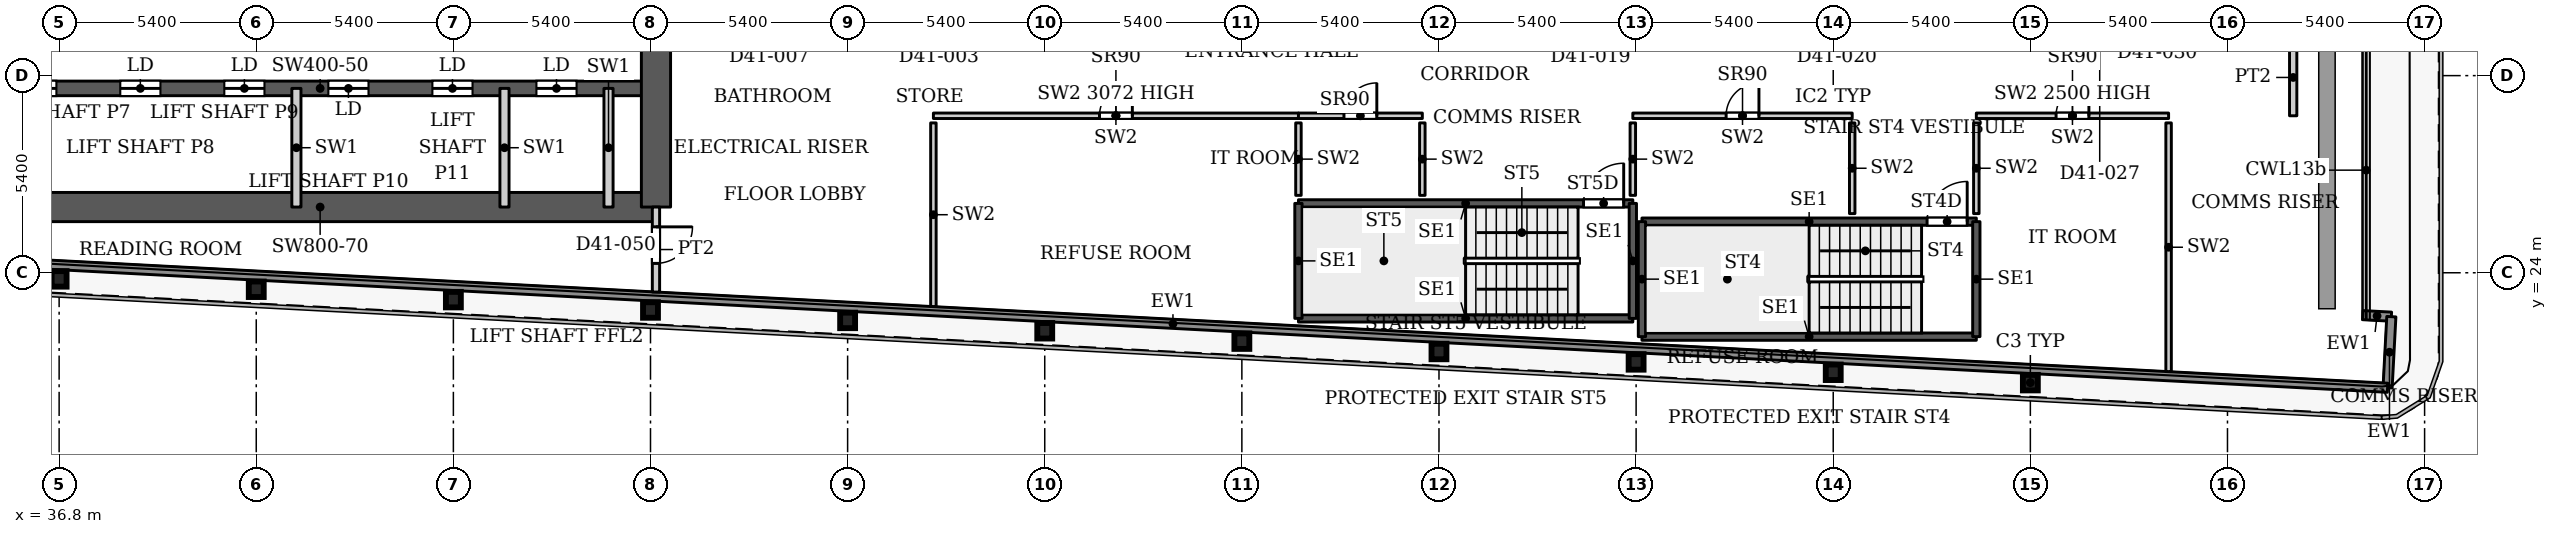
"""IFC4 building model, lengths in metres.
Left out: names, types, materials, properties, quantities, classifications, styles, units other than length and angle.
Written with IfcOpenShell. Run it as: python <this file> out.ifc"""

import sys

from ifc_helpers import new_model, si_unit, direction, frame, frame_2d, origin, origin_2d, place, context, subcontext, project, spatial, rectangle, i_section, extrude, source, transform, mapped, element, fill, save


model = new_model("IFC4")
c1 = context("Model", 3, precision=1e-05, world=origin(), true_north=direction((0.0, 1.0)))
c2 = subcontext(c1, "Body", "Model", "MODEL_VIEW")
j1 = project(units=[si_unit("LENGTHUNIT", "METRE"), si_unit("PLANEANGLEUNIT", "RADIAN")], contexts=[c1])
p1 = place(None, origin())
s1 = spatial("IfcSite", under=j1, at=p1, CompositionType="ELEMENT")
p2 = place(p1, origin())
s2 = spatial("IfcBuilding", under=s1, at=p2, CompositionType="ELEMENT")
p3 = place(p2, frame((0.0, 0.0, 176.0)))
s3 = spatial("IfcBuildingStorey", under=s2, at=p3, CompositionType="ELEMENT", Elevation=176.0)
for number, where, z_axis, x_axis in (
    (1, (90.8, 20.99, 0.0), (0.0, 0.0, 1.0), (1.0, 0.0, 0.0)),
    (2, (85.4, 21.274, 0.0), (0.0, 0.0, 1.0), (1.0, 0.0, 0.0)),
    (3, (80.0, 21.558, 0.0), (0.0, 0.0, 1.0), (1.0, 0.0, 0.0)),
    (4, (74.6, 21.843, 0.0), (0.0, 0.0, 1.0), (1.0, 0.0, 0.0)),
    (5, (69.2, 22.127, 0.0), (0.0, 0.0, 1.0), (1.0, 0.0, 0.0)),
    (6, (63.8, 22.411, 0.0), (0.0, 0.0, 1.0), (1.0, 0.0, 0.0)),
    (7, (58.4, 22.695, 0.0), (0.0, 0.0, 1.0), (1.0, 0.0, 0.0)),
    (8, (53.0, 22.98, 0.0), (0.0, 0.0, 1.0), (1.0, 0.0, 0.0)),
    (9, (47.6, 23.264, 0.0), (0.0, 0.0, 1.0), (1.0, 0.0, 0.0)),
    (10, (42.2, 23.548, 0.0), (0.0, 0.0, 1.0), (1.0, 0.0, 0.0)),
    (11, (36.8, 23.832, 0.0), (0.0, 0.0, 1.0), (1.0, 0.0, 0.0)),
):
    element("IfcColumn", number, at=place(p3, frame(where, z_axis=z_axis, x_axis=x_axis)), inside=s3, PredefinedType="COLUMN", context=c2, shape_type="SweptSolid", body=[
        extrude(i_section(OverallWidth=0.409, OverallDepth=0.425, WebThickness=0.033, FlangeThickness=0.052, FilletRadius=0.013, at=origin_2d()), origin(), (0.0, 0.0, 1.0), 3.9),
    ])
p4 = place(p3, frame((34.75, 25.8, 0.0), z_axis=(0.0, 0.0, 1.0), x_axis=(1.0, 0.0, 0.0)))
e12 = element("IfcWall", 12, at=p4, inside=s3, PredefinedType="SHEAR", context=c2, shape_type="SweptSolid", body=[
    extrude(rectangle(XDim=18.4, YDim=0.8, at=frame_2d((9.2, 0.0))), origin(), (0.0, 0.0, 1.0), 3.9),
])
p5 = place(p3, frame((34.75, 29.05, 0.0), z_axis=(0.0, 0.0, 1.0), x_axis=(1.0, 0.0, 0.0)))
e13 = element("IfcWall", 13, at=p5, inside=s3, PredefinedType="SHEAR", context=c2, shape_type="SweptSolid", body=[
    extrude(rectangle(XDim=18.4, YDim=0.4, at=frame_2d((9.2, 0.0))), origin(), (0.0, 0.0, 1.0), 3.9),
])
p6 = place(p5, frame((0.875, 0.0, 0.0)))
e14 = element("IfcOpeningElement", 14, at=p6, cuts=e13, PredefinedType="OPENING", context=c2, shape_type="SweptSolid", body=[
    extrude(rectangle(XDim=1.1, YDim=2.2, at=frame_2d((0.55, 1.1))), frame((0.0, 0.21, 0.0), z_axis=(0.0, -1.0, 0.0), x_axis=(1.0, 0.0, 0.0)), (0.0, 0.0, 1.0), 0.42),
])
p7 = place(p5, frame((3.725, 0.0, 0.0)))
e15 = element("IfcOpeningElement", 15, at=p7, cuts=e13, PredefinedType="OPENING", context=c2, shape_type="SweptSolid", body=[
    extrude(rectangle(XDim=1.1, YDim=2.2, at=frame_2d((0.55, 1.1))), frame((0.0, 0.21, 0.0), z_axis=(0.0, -1.0, 0.0), x_axis=(1.0, 0.0, 0.0)), (0.0, 0.0, 1.0), 0.42),
])
p8 = place(p5, frame((6.575, 0.0, 0.0)))
e16 = element("IfcOpeningElement", 16, at=p8, cuts=e13, PredefinedType="OPENING", context=c2, shape_type="SweptSolid", body=[
    extrude(rectangle(XDim=1.1, YDim=2.2, at=frame_2d((0.55, 1.1))), frame((0.0, 0.21, 0.0), z_axis=(0.0, -1.0, 0.0), x_axis=(1.0, 0.0, 0.0)), (0.0, 0.0, 1.0), 0.42),
])
p9 = place(p5, frame((9.425, 0.0, 0.0)))
e17 = element("IfcOpeningElement", 17, at=p9, cuts=e13, PredefinedType="OPENING", context=c2, shape_type="SweptSolid", body=[
    extrude(rectangle(XDim=1.1, YDim=2.2, at=frame_2d((0.55, 1.1))), frame((0.0, 0.21, 0.0), z_axis=(0.0, -1.0, 0.0), x_axis=(1.0, 0.0, 0.0)), (0.0, 0.0, 1.0), 0.42),
])
p10 = place(p5, frame((12.275, 0.0, 0.0)))
e18 = element("IfcOpeningElement", 18, at=p10, cuts=e13, PredefinedType="OPENING", context=c2, shape_type="SweptSolid", body=[
    extrude(rectangle(XDim=1.1, YDim=2.2, at=frame_2d((0.55, 1.1))), frame((0.0, 0.21, 0.0), z_axis=(0.0, -1.0, 0.0), x_axis=(1.0, 0.0, 0.0)), (0.0, 0.0, 1.0), 0.42),
])
p11 = place(p5, frame((15.125, 0.0, 0.0)))
e19 = element("IfcOpeningElement", 19, at=p11, cuts=e13, PredefinedType="OPENING", context=c2, shape_type="SweptSolid", body=[
    extrude(rectangle(XDim=1.1, YDim=2.2, at=frame_2d((0.55, 1.1))), frame((0.0, 0.21, 0.0), z_axis=(0.0, -1.0, 0.0), x_axis=(1.0, 0.0, 0.0)), (0.0, 0.0, 1.0), 0.42),
])
p12 = place(p3, frame((53.15, 25.8, 0.0), z_axis=(0.0, 0.0, 1.0), x_axis=(0.0, 1.0, 0.0)))
e20 = element("IfcWall", 20, at=p12, inside=s3, PredefinedType="SHEAR", context=c2, shape_type="SweptSolid", body=[
    extrude(rectangle(XDim=10.4, YDim=0.8, at=frame_2d((5.2, 0.0))), origin(), (0.0, 0.0, 1.0), 3.9),
])
p13 = place(p3, frame((99.907, 22.839, 0.0), z_axis=(0.0, 0.0, 1.0), x_axis=(0.998561284263, -0.053622398031, 0.0)))
e21 = element("IfcWall", 21, at=p13, inside=s3, PredefinedType="SOLIDWALL", context=c2, shape_type="SweptSolid", body=[
    extrude(rectangle(XDim=0.783, YDim=0.25, at=frame_2d((0.392, 0.0))), origin(), (0.0, 0.0, 1.0), 3.75),
])
p14 = place(p3, frame((100.689, 22.797, 0.0), z_axis=(0.0, 0.0, 1.0), x_axis=(-0.052841433274, -0.998602915542, 0.0)))
e22 = element("IfcWall", 22, at=p14, inside=s3, PredefinedType="SOLIDWALL", context=c2, shape_type="SweptSolid", body=[
    extrude(rectangle(XDim=1.95, YDim=0.25, at=frame_2d((0.975, 0.0))), origin(), (0.0, 0.0, 1.0), 3.75),
])
p15 = place(p3, frame((100.586, 20.85, 0.0), z_axis=(0.0, 0.0, 1.0), x_axis=(-0.99861746497, 0.052565755559, 0.0)))
e23 = element("IfcWall", 23, at=p15, inside=s3, PredefinedType="SOLIDWALL", context=c2, shape_type="SweptSolid", body=[
    extrude(rectangle(XDim=66.639, YDim=0.25, at=frame_2d((33.319, 0.0))), origin(), (0.0, 0.0, 1.0), 3.75),
])
p16 = place(p3, frame((80.16, 22.25, 0.0), z_axis=(0.0, 0.0, 1.0), x_axis=(1.0, 0.0, 0.0)))
e24 = element("IfcWall", 24, at=p16, inside=s3, PredefinedType="SHEAR", context=c2, shape_type="SweptSolid", body=[
    extrude(rectangle(XDim=9.16, YDim=0.2, at=frame_2d((4.58, 0.0))), origin(), (0.0, 0.0, 1.0), 3.9),
])
p17 = place(p3, frame((80.16, 25.4, 0.0), z_axis=(0.0, 0.0, 1.0), x_axis=(1.0, 0.0, 0.0)))
e25 = element("IfcWall", 25, at=p17, inside=s3, PredefinedType="SHEAR", context=c2, shape_type="SweptSolid", body=[
    extrude(rectangle(XDim=9.16, YDim=0.2, at=frame_2d((4.58, 0.0))), origin(), (0.0, 0.0, 1.0), 3.9),
])
p18 = place(p17, frame((7.81, 0.0, 0.0)))
e26 = element("IfcOpeningElement", 26, at=p18, cuts=e25, PredefinedType="OPENING", context=c2, shape_type="SweptSolid", body=[
    extrude(rectangle(XDim=1.1, YDim=2.2, at=frame_2d((0.55, 1.1))), frame((0.0, 0.11, 0.0), z_axis=(0.0, -1.0, 0.0), x_axis=(1.0, 0.0, 0.0)), (0.0, 0.0, 1.0), 0.22),
])
for number, where, z_axis, x_axis in (
    (27, (80.16, 22.25, 0.0), (0.0, 0.0, 1.0), (0.0, 1.0, 0.0)),
    (28, (89.32, 22.25, 0.0), (0.0, 0.0, 1.0), (0.0, 1.0, 0.0)),
):
    element("IfcWall", number, at=place(p3, frame(where, z_axis=z_axis, x_axis=x_axis)), inside=s3, PredefinedType="SHEAR", context=c2, shape_type="SweptSolid", body=[
        extrude(rectangle(XDim=3.15, YDim=0.2, at=frame_2d((1.575, 0.0))), origin(), (0.0, 0.0, 1.0), 3.9),
    ])
p19 = place(p3, frame((70.75, 22.75, 0.0), z_axis=(0.0, 0.0, 1.0), x_axis=(1.0, 0.0, 0.0)))
e29 = element("IfcWall", 29, at=p19, inside=s3, PredefinedType="SHEAR", context=c2, shape_type="SweptSolid", body=[
    extrude(rectangle(XDim=9.16, YDim=0.2, at=frame_2d((4.58, 0.0))), origin(), (0.0, 0.0, 1.0), 3.9),
])
p20 = place(p3, frame((70.75, 25.9, 0.0), z_axis=(0.0, 0.0, 1.0), x_axis=(1.0, 0.0, 0.0)))
e30 = element("IfcWall", 30, at=p20, inside=s3, PredefinedType="SHEAR", context=c2, shape_type="SweptSolid", body=[
    extrude(rectangle(XDim=9.16, YDim=0.2, at=frame_2d((4.58, 0.0))), origin(), (0.0, 0.0, 1.0), 3.9),
])
p21 = place(p20, frame((7.81, 0.0, 0.0)))
e31 = element("IfcOpeningElement", 31, at=p21, cuts=e30, PredefinedType="OPENING", context=c2, shape_type="SweptSolid", body=[
    extrude(rectangle(XDim=1.1, YDim=2.2, at=frame_2d((0.55, 1.1))), frame((0.0, 0.11, 0.0), z_axis=(0.0, -1.0, 0.0), x_axis=(1.0, 0.0, 0.0)), (0.0, 0.0, 1.0), 0.22),
])
for number, where, z_axis, x_axis in (
    (32, (70.75, 22.75, 0.0), (0.0, 0.0, 1.0), (0.0, 1.0, 0.0)),
    (33, (79.91, 22.75, 0.0), (0.0, 0.0, 1.0), (0.0, 1.0, 0.0)),
):
    element("IfcWall", number, at=place(p3, frame(where, z_axis=z_axis, x_axis=x_axis)), inside=s3, PredefinedType="SHEAR", context=c2, shape_type="SweptSolid", body=[
        extrude(rectangle(XDim=3.15, YDim=0.2, at=frame_2d((1.575, 0.0))), origin(), (0.0, 0.0, 1.0), 3.9),
    ])
for number, where, z_axis, x_axis in (
    (34, (43.3, 25.8, 0.0), (0.0, 0.0, 1.0), (0.0, 1.0, 0.0)),
    (35, (49.0, 25.8, 0.0), (0.0, 0.0, 1.0), (0.0, 1.0, 0.0)),
    (36, (51.85, 25.8, 0.0), (0.0, 0.0, 1.0), (0.0, 1.0, 0.0)),
):
    element("IfcWall", number, at=place(p3, frame(where, z_axis=z_axis, x_axis=x_axis)), inside=s3, PredefinedType="PARTITIONING", context=c2, shape_type="SweptSolid", body=[
        extrude(rectangle(XDim=3.25, YDim=0.25, at=frame_2d((1.625, 0.0))), origin(), (0.0, 0.0, 1.0), 3.9),
    ])
p22 = place(p3, frame((60.75, 28.3, 0.0), z_axis=(0.0, 0.0, 1.0), x_axis=(1.0, 0.0, 0.0)))
e37 = element("IfcWall", 37, at=p22, inside=s3, PredefinedType="PARTITIONING", context=c2, shape_type="SweptSolid", body=[
    extrude(rectangle(XDim=10.0, YDim=0.15, at=frame_2d((5.0, 0.0))), origin(), (0.0, 0.0, 1.0), 3.072),
])
p23 = place(p22, frame((4.55, 0.0, 0.0)))
e38 = element("IfcOpeningElement", 38, at=p23, cuts=e37, PredefinedType="OPENING", context=c2, shape_type="SweptSolid", body=[
    extrude(rectangle(XDim=0.9, YDim=2.2, at=frame_2d((0.45, 1.1))), frame((0.0, 0.085, 0.0), z_axis=(0.0, -1.0, 0.0), x_axis=(1.0, 0.0, 0.0)), (0.0, 0.0, 1.0), 0.17),
])
p24 = place(p3, frame((60.75, 23.075, 0.0), z_axis=(0.0, 0.0, 1.0), x_axis=(0.0, 1.0, 0.0)))
e39 = element("IfcWall", 39, at=p24, inside=s3, PredefinedType="PARTITIONING", context=c2, shape_type="SweptSolid", body=[
    extrude(rectangle(XDim=5.03, YDim=0.15, at=frame_2d((2.515, 0.0))), origin(), (0.0, 0.0, 1.0), 3.9),
])
p25 = place(p3, frame((70.75, 26.12, 0.0), z_axis=(0.0, 0.0, 1.0), x_axis=(0.0, 1.0, 0.0)))
e40 = element("IfcWall", 40, at=p25, inside=s3, PredefinedType="PARTITIONING", context=c2, shape_type="SweptSolid", body=[
    extrude(rectangle(XDim=1.985, YDim=0.15, at=frame_2d((0.992, 0.0))), origin(), (0.0, 0.0, 1.0), 3.9),
])
p26 = place(p3, frame((70.75, 28.3, 0.0), z_axis=(0.0, 0.0, 1.0), x_axis=(1.0, 0.0, 0.0)))
e41 = element("IfcWall", 41, at=p26, inside=s3, PredefinedType="PARTITIONING", context=c2, shape_type="SweptSolid", body=[
    extrude(rectangle(XDim=3.394, YDim=0.15, at=frame_2d((1.697, 0.0))), origin(), (0.0, 0.0, 1.0), 3.9),
])
p27 = place(p26, frame((1.247, 0.0, 0.0)))
e42 = element("IfcOpeningElement", 42, at=p27, cuts=e41, PredefinedType="OPENING", context=c2, shape_type="SweptSolid", body=[
    extrude(rectangle(XDim=0.9, YDim=2.2, at=frame_2d((0.45, 1.1))), frame((0.0, 0.085, 0.0), z_axis=(0.0, -1.0, 0.0), x_axis=(1.0, 0.0, 0.0)), (0.0, 0.0, 1.0), 0.17),
])
p28 = place(p3, frame((74.144, 26.12, 0.0), z_axis=(0.0, 0.0, 1.0), x_axis=(0.0, 1.0, 0.0)))
e43 = element("IfcWall", 43, at=p28, inside=s3, PredefinedType="PARTITIONING", context=c2, shape_type="SweptSolid", body=[
    extrude(rectangle(XDim=1.985, YDim=0.15, at=frame_2d((0.992, 0.0))), origin(), (0.0, 0.0, 1.0), 3.9),
])
p29 = place(p3, frame((79.91, 28.3, 0.0), z_axis=(0.0, 0.0, 1.0), x_axis=(1.0, 0.0, 0.0)))
e44 = element("IfcWall", 44, at=p29, inside=s3, PredefinedType="PARTITIONING", context=c2, shape_type="SweptSolid", body=[
    extrude(rectangle(XDim=6.01, YDim=0.15, at=frame_2d((3.005, 0.0))), origin(), (0.0, 0.0, 1.0), 3.9),
])
p30 = place(p29, frame((2.555, 0.0, 0.0)))
e45 = element("IfcOpeningElement", 45, at=p30, cuts=e44, PredefinedType="OPENING", context=c2, shape_type="SweptSolid", body=[
    extrude(rectangle(XDim=0.9, YDim=2.2, at=frame_2d((0.45, 1.1))), frame((0.0, 0.085, 0.0), z_axis=(0.0, -1.0, 0.0), x_axis=(1.0, 0.0, 0.0)), (0.0, 0.0, 1.0), 0.17),
])
p31 = place(p3, frame((79.91, 26.12, 0.0), z_axis=(0.0, 0.0, 1.0), x_axis=(0.0, 1.0, 0.0)))
e46 = element("IfcWall", 46, at=p31, inside=s3, PredefinedType="PARTITIONING", context=c2, shape_type="SweptSolid", body=[
    extrude(rectangle(XDim=1.985, YDim=0.15, at=frame_2d((0.992, 0.0))), origin(), (0.0, 0.0, 1.0), 3.9),
])
p32 = place(p3, frame((85.92, 25.62, 0.0), z_axis=(0.0, 0.0, 1.0), x_axis=(0.0, 1.0, 0.0)))
e47 = element("IfcWall", 47, at=p32, inside=s3, PredefinedType="PARTITIONING", context=c2, shape_type="SweptSolid", body=[
    extrude(rectangle(XDim=2.485, YDim=0.15, at=frame_2d((1.242, 0.0))), origin(), (0.0, 0.0, 1.0), 3.9),
])
p33 = place(p3, frame((89.32, 28.3, 0.0), z_axis=(0.0, 0.0, 1.0), x_axis=(1.0, 0.0, 0.0)))
e48 = element("IfcWall", 48, at=p33, inside=s3, PredefinedType="PARTITIONING", context=c2, shape_type="SweptSolid", body=[
    extrude(rectangle(XDim=5.267, YDim=0.15, at=frame_2d((2.633, 0.0))), origin(), (0.0, 0.0, 1.0), 2.5),
])
p34 = place(p33, frame((2.184, 0.0, 0.0)))
e49 = element("IfcOpeningElement", 49, at=p34, cuts=e48, PredefinedType="OPENING", context=c2, shape_type="SweptSolid", body=[
    extrude(rectangle(XDim=0.9, YDim=2.2, at=frame_2d((0.45, 1.1))), frame((0.0, 0.085, 0.0), z_axis=(0.0, -1.0, 0.0), x_axis=(1.0, 0.0, 0.0)), (0.0, 0.0, 1.0), 0.17),
])
p35 = place(p3, frame((89.32, 25.62, 0.0), z_axis=(0.0, 0.0, 1.0), x_axis=(0.0, 1.0, 0.0)))
e50 = element("IfcWall", 50, at=p35, inside=s3, PredefinedType="PARTITIONING", context=c2, shape_type="SweptSolid", body=[
    extrude(rectangle(XDim=2.485, YDim=0.15, at=frame_2d((1.242, 0.0))), origin(), (0.0, 0.0, 1.0), 3.9),
])
p36 = place(p3, frame((94.587, 21.293, 0.0), z_axis=(0.0, 0.0, 1.0), x_axis=(0.0, 1.0, 0.0)))
e51 = element("IfcWall", 51, at=p36, inside=s3, PredefinedType="PARTITIONING", context=c2, shape_type="SweptSolid", body=[
    extrude(rectangle(XDim=6.812, YDim=0.15, at=frame_2d((3.406, 0.0))), origin(), (0.0, 0.0, 1.0), 3.9),
])
p37 = place(p3, frame((53.15, 23.472, 0.0), z_axis=(0.0, 0.0, 1.0), x_axis=(0.0, 1.0, 0.0)))
e52 = element("IfcWall", 52, at=p37, inside=s3, PredefinedType="PARTITIONING", context=c2, shape_type="SweptSolid", body=[
    extrude(rectangle(XDim=2.328, YDim=0.2, at=frame_2d((1.164, 0.0))), origin(), (0.0, 0.0, 1.0), 3.6),
])
p38 = place(p37, frame((0.785, 0.0, 0.0)))
e53 = element("IfcOpeningElement", 53, at=p38, cuts=e52, PredefinedType="OPENING", context=c2, shape_type="SweptSolid", body=[
    extrude(rectangle(XDim=1.0, YDim=2.1, at=frame_2d((0.5, 1.05))), frame((0.0, 0.11, 0.0), z_axis=(0.0, -1.0, 0.0), x_axis=(1.0, 0.0, 0.0)), (0.0, 0.0, 1.0), 0.22),
])
p39 = place(p3, frame((98.0, 28.3, 0.0), z_axis=(0.0, 0.0, 1.0), x_axis=(0.0, 1.0, 0.0)))
e54 = element("IfcWall", 54, at=p39, inside=s3, PredefinedType="PARTITIONING", context=c2, shape_type="SweptSolid", body=[
    extrude(rectangle(XDim=2.1, YDim=0.2, at=frame_2d((1.05, 0.0))), origin(), (0.0, 0.0, 1.0), 3.6),
])
m1 = source(origin(), c2, "Body", "SweptSolid", [
    extrude(rectangle(XDim=1.1, YDim=2.2, at=frame_2d((0.55, 1.1))), frame((0.0, 0.025, 0.0), z_axis=(0.0, -1.0, 0.0), x_axis=(1.0, 0.0, 0.0)), (0.0, 0.0, 1.0), 0.05),
])
p40 = place(p6, origin())
e55 = element("IfcDoor", 55, at=p40, inside=s3, OperationType="SLIDING_TO_LEFT", PredefinedType="DOOR", context=c2, shape_type="MappedRepresentation", body=[
    mapped(m1, transform((0.0, 0.0, 0.0), x_axis=(1.0, 0.0, 0.0), y_axis=(0.0, 1.0, 0.0), z_axis=(0.0, 0.0, 1.0), scale=1.0)),
])
fill(e14, e55)
p41 = place(p7, origin())
e56 = element("IfcDoor", 56, at=p41, inside=s3, OperationType="SLIDING_TO_LEFT", PredefinedType="DOOR", context=c2, shape_type="MappedRepresentation", body=[
    mapped(m1, transform((0.0, 0.0, 0.0), x_axis=(1.0, 0.0, 0.0), y_axis=(0.0, 1.0, 0.0), z_axis=(0.0, 0.0, 1.0), scale=1.0)),
])
fill(e15, e56)
p42 = place(p8, origin())
e57 = element("IfcDoor", 57, at=p42, inside=s3, OperationType="SLIDING_TO_LEFT", PredefinedType="DOOR", context=c2, shape_type="MappedRepresentation", body=[
    mapped(m1, transform((0.0, 0.0, 0.0), x_axis=(1.0, 0.0, 0.0), y_axis=(0.0, 1.0, 0.0), z_axis=(0.0, 0.0, 1.0), scale=1.0)),
])
fill(e16, e57)
p43 = place(p9, origin())
e58 = element("IfcDoor", 58, at=p43, inside=s3, OperationType="SLIDING_TO_LEFT", PredefinedType="DOOR", context=c2, shape_type="MappedRepresentation", body=[
    mapped(m1, transform((0.0, 0.0, 0.0), x_axis=(1.0, 0.0, 0.0), y_axis=(0.0, 1.0, 0.0), z_axis=(0.0, 0.0, 1.0), scale=1.0)),
])
fill(e17, e58)
p44 = place(p10, origin())
e59 = element("IfcDoor", 59, at=p44, inside=s3, OperationType="SLIDING_TO_LEFT", PredefinedType="DOOR", context=c2, shape_type="MappedRepresentation", body=[
    mapped(m1, transform((0.0, 0.0, 0.0), x_axis=(1.0, 0.0, 0.0), y_axis=(0.0, 1.0, 0.0), z_axis=(0.0, 0.0, 1.0), scale=1.0)),
])
fill(e18, e59)
p45 = place(p11, origin())
e60 = element("IfcDoor", 60, at=p45, inside=s3, OperationType="SLIDING_TO_LEFT", PredefinedType="DOOR", context=c2, shape_type="MappedRepresentation", body=[
    mapped(m1, transform((0.0, 0.0, 0.0), x_axis=(1.0, 0.0, 0.0), y_axis=(0.0, 1.0, 0.0), z_axis=(0.0, 0.0, 1.0), scale=1.0)),
])
fill(e19, e60)
m2 = source(origin(), c2, "Body", "SweptSolid", [
    extrude(rectangle(XDim=0.9, YDim=2.2, at=frame_2d((0.45, 1.1))), frame((0.0, 0.025, 0.0), z_axis=(0.0, -1.0, 0.0), x_axis=(1.0, 0.0, 0.0)), (0.0, 0.0, 1.0), 0.05),
])
p46 = place(p23, origin())
e61 = element("IfcDoor", 61, at=p46, inside=s3, OperationType="SINGLE_SWING_LEFT", PredefinedType="DOOR", context=c2, shape_type="MappedRepresentation", body=[
    mapped(m2, transform((0.0, 0.0, 0.0), x_axis=(1.0, 0.0, 0.0), y_axis=(0.0, 1.0, 0.0), z_axis=(0.0, 0.0, 1.0), scale=1.0)),
])
fill(e38, e61)
p47 = place(p27, origin())
e62 = element("IfcDoor", 62, at=p47, inside=s3, OperationType="SINGLE_SWING_LEFT", PredefinedType="DOOR", context=c2, shape_type="MappedRepresentation", body=[
    mapped(m2, transform((0.0, 0.0, 0.0), x_axis=(1.0, 0.0, 0.0), y_axis=(0.0, 1.0, 0.0), z_axis=(0.0, 0.0, 1.0), scale=1.0)),
])
fill(e42, e62)
p48 = place(p30, origin())
e63 = element("IfcDoor", 63, at=p48, inside=s3, OperationType="SINGLE_SWING_LEFT", PredefinedType="DOOR", context=c2, shape_type="MappedRepresentation", body=[
    mapped(m2, transform((0.0, 0.0, 0.0), x_axis=(1.0, 0.0, 0.0), y_axis=(0.0, 1.0, 0.0), z_axis=(0.0, 0.0, 1.0), scale=1.0)),
])
fill(e45, e63)
p49 = place(p34, origin())
e64 = element("IfcDoor", 64, at=p49, inside=s3, OperationType="SINGLE_SWING_LEFT", PredefinedType="DOOR", context=c2, shape_type="MappedRepresentation", body=[
    mapped(m2, transform((0.0, 0.0, 0.0), x_axis=(1.0, 0.0, 0.0), y_axis=(0.0, 1.0, 0.0), z_axis=(0.0, 0.0, 1.0), scale=1.0)),
])
fill(e49, e64)
m3 = source(origin(), c2, "Body", "SweptSolid", [
    extrude(rectangle(XDim=1.1, YDim=2.2, at=frame_2d((0.55, 1.1))), frame((0.0, 0.025, 0.0), z_axis=(0.0, -1.0, 0.0), x_axis=(1.0, 0.0, 0.0)), (0.0, 0.0, 1.0), 0.05),
])
p50 = place(p18, origin())
e65 = element("IfcDoor", 65, at=p50, inside=s3, OperationType="SINGLE_SWING_LEFT", PredefinedType="DOOR", context=c2, shape_type="MappedRepresentation", body=[
    mapped(m3, transform((0.0, 0.0, 0.0), x_axis=(1.0, 0.0, 0.0), y_axis=(0.0, 1.0, 0.0), z_axis=(0.0, 0.0, 1.0), scale=1.0)),
])
fill(e26, e65)
p51 = place(p21, origin())
e66 = element("IfcDoor", 66, at=p51, inside=s3, OperationType="SINGLE_SWING_LEFT", PredefinedType="DOOR", context=c2, shape_type="MappedRepresentation", body=[
    mapped(m3, transform((0.0, 0.0, 0.0), x_axis=(1.0, 0.0, 0.0), y_axis=(0.0, 1.0, 0.0), z_axis=(0.0, 0.0, 1.0), scale=1.0)),
])
fill(e31, e66)
m4 = source(origin(), c2, "Body", "SweptSolid", [
    extrude(rectangle(XDim=1.0, YDim=2.1, at=frame_2d((0.5, 1.05))), frame((0.0, 0.025, 0.0), z_axis=(0.0, -1.0, 0.0), x_axis=(1.0, 0.0, 0.0)), (0.0, 0.0, 1.0), 0.05),
])
p52 = place(p38, origin())
e67 = element("IfcDoor", 67, at=p52, inside=s3, OperationType="SINGLE_SWING_RIGHT", PredefinedType="DOOR", context=c2, shape_type="MappedRepresentation", body=[
    mapped(m4, transform((0.0, 0.0, 0.0), x_axis=(1.0, 0.0, 0.0), y_axis=(0.0, 1.0, 0.0), z_axis=(0.0, 0.0, 1.0), scale=1.0)),
])
fill(e53, e67)
save(model, sys.argv[1])
